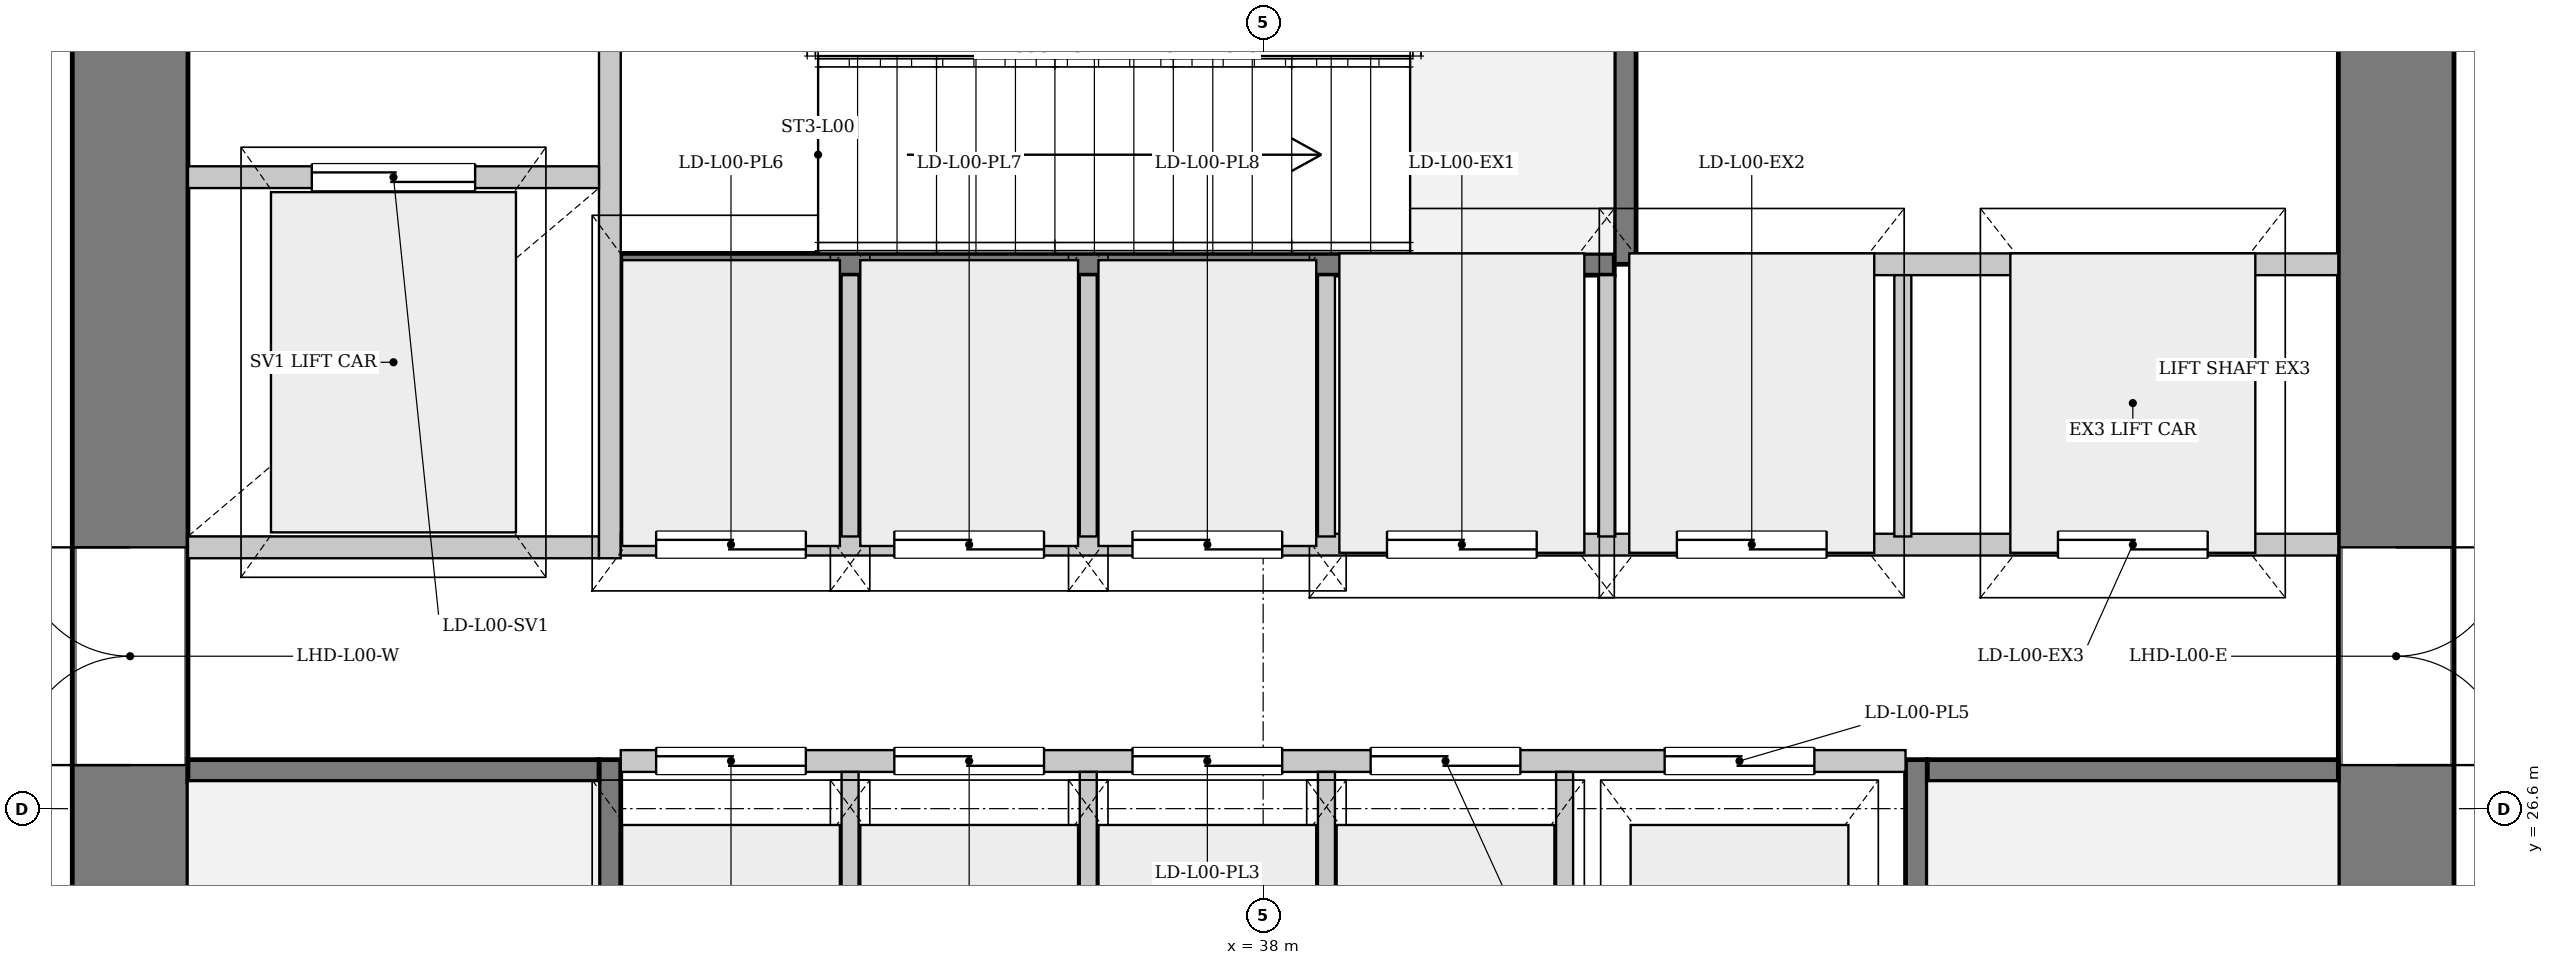
"""IFC4 building model, lengths in metres.
Left out: names, types, materials, properties, quantities, classifications, styles, units other than length and angle.
Written with IfcOpenShell. Run it as: python <this file> out.ifc"""

import sys

from ifc_helpers import new_model, si_unit, direction, frame, frame_2d, origin, place, context, subcontext, project, spatial, rectangle, extrude, source, transform, mapped, element, fill, save


model = new_model("IFC4")
c1 = context("Model", 3, precision=1e-05, world=origin(), true_north=direction((0.0, 1.0)))
c2 = subcontext(c1, "Body", "Model", "MODEL_VIEW")
j1 = project(units=[si_unit("LENGTHUNIT", "METRE"), si_unit("PLANEANGLEUNIT", "RADIAN")], contexts=[c1])
p1 = place(None, origin())
s1 = spatial("IfcSite", under=j1, at=p1, CompositionType="ELEMENT")
p2 = place(p1, origin())
s2 = spatial("IfcBuilding", under=s1, at=p2, CompositionType="ELEMENT")
p3 = place(p2, origin())
s3 = spatial("IfcBuildingStorey", under=s2, at=p3, CompositionType="ELEMENT", Elevation=0.0)
p4 = place(p3, frame((29.675, 19.5, 0.0), z_axis=(0.0, 0.0, 1.0), x_axis=(0.0, 1.0, 0.0)))
e1 = element("IfcWall", 1, at=p4, inside=s3, PredefinedType="SHEAR", context=c2, shape_type="SweptSolid", body=[
    extrude(rectangle(XDim=14.2, YDim=0.85, at=frame_2d((7.1, 0.0))), origin(), (0.0, 0.0, 1.0), 5.08),
])
p5 = place(p4, frame((7.42, 0.0, 0.0)))
e2 = element("IfcOpeningElement", 2, at=p5, cuts=e1, PredefinedType="OPENING", context=c2, shape_type="SweptSolid", body=[
    extrude(rectangle(XDim=1.6, YDim=2.2, at=frame_2d((0.8, 1.1))), frame((0.0, 0.435, 0.0), z_axis=(0.0, -1.0, 0.0), x_axis=(1.0, 0.0, 0.0)), (0.0, 0.0, 1.0), 0.87),
])
p6 = place(p3, frame((46.325, 33.7, 0.0), z_axis=(0.0, 0.0, 1.0), x_axis=(0.0, -1.0, 0.0)))
e3 = element("IfcWall", 3, at=p6, inside=s3, PredefinedType="SHEAR", context=c2, shape_type="SweptSolid", body=[
    extrude(rectangle(XDim=14.2, YDim=0.85, at=frame_2d((7.1, 0.0))), origin(), (0.0, 0.0, 1.0), 5.08),
])
p7 = place(p6, frame((5.18, 0.0, 0.0)))
e4 = element("IfcOpeningElement", 4, at=p7, cuts=e3, PredefinedType="OPENING", context=c2, shape_type="SweptSolid", body=[
    extrude(rectangle(XDim=1.6, YDim=2.2, at=frame_2d((0.8, 1.1))), frame((0.0, 0.435, 0.0), z_axis=(0.0, -1.0, 0.0), x_axis=(1.0, 0.0, 0.0)), (0.0, 0.0, 1.0), 0.87),
])
p8 = place(p3, frame((33.2, 19.5, 0.0), z_axis=(0.0, 0.0, 1.0), x_axis=(0.0, 1.0, 0.0)))
e5 = element("IfcWall", 5, at=p8, inside=s3, PredefinedType="PARTITIONING", context=c2, shape_type="SweptSolid", body=[
    extrude(rectangle(XDim=7.46, YDim=0.16, at=frame_2d((3.73, 0.0))), origin(), (0.0, 0.0, 1.0), 5.08),
])
p9 = place(p8, frame((0.08, 0.0, 0.0)))
e6 = element("IfcOpeningElement", 6, at=p9, cuts=e5, PredefinedType="OPENING", context=c2, shape_type="SweptSolid", body=[
    extrude(rectangle(XDim=1.32, YDim=2.2, at=frame_2d((0.66, 1.1))), frame((0.0, 0.09, 0.0), z_axis=(0.0, -1.0, 0.0), x_axis=(1.0, 0.0, 0.0)), (0.0, 0.0, 1.0), 0.18),
])
p10 = place(p3, frame((30.1, 26.88, 0.0), z_axis=(0.0, 0.0, 1.0), x_axis=(1.0, 0.0, 0.0)))
e7 = element("IfcWall", 7, at=p10, inside=s3, PredefinedType="PARTITIONING", context=c2, shape_type="SweptSolid", body=[
    extrude(rectangle(XDim=3.02, YDim=0.16, at=frame_2d((1.51, 0.0))), origin(), (0.0, 0.0, 1.0), 5.08),
])
p11 = place(p3, frame((42.8, 26.96, 0.0), z_axis=(0.0, 0.0, 1.0), x_axis=(0.0, -1.0, 0.0)))
e8 = element("IfcWall", 8, at=p11, inside=s3, PredefinedType="PARTITIONING", context=c2, shape_type="SweptSolid", body=[
    extrude(rectangle(XDim=7.46, YDim=0.16, at=frame_2d((3.73, 0.0))), origin(), (0.0, 0.0, 1.0), 5.08),
])
p12 = place(p11, frame((6.06, 0.0, 0.0)))
e9 = element("IfcOpeningElement", 9, at=p12, cuts=e8, PredefinedType="OPENING", context=c2, shape_type="SweptSolid", body=[
    extrude(rectangle(XDim=1.32, YDim=2.2, at=frame_2d((0.66, 1.1))), frame((0.0, 0.09, 0.0), z_axis=(0.0, -1.0, 0.0), x_axis=(1.0, 0.0, 0.0)), (0.0, 0.0, 1.0), 0.18),
])
p13 = place(p3, frame((42.88, 26.88, 0.0), z_axis=(0.0, 0.0, 1.0), x_axis=(1.0, 0.0, 0.0)))
e10 = element("IfcWall", 10, at=p13, inside=s3, PredefinedType="PARTITIONING", context=c2, shape_type="SweptSolid", body=[
    extrude(rectangle(XDim=3.02, YDim=0.16, at=frame_2d((1.51, 0.0))), origin(), (0.0, 0.0, 1.0), 5.08),
])
p14 = place(p3, frame((33.28, 30.6, 0.0), z_axis=(0.0, 0.0, 1.0), x_axis=(1.0, 0.0, 0.0)))
e11 = element("IfcWall", 11, at=p14, inside=s3, PredefinedType="PARTITIONING", context=c2, shape_type="SweptSolid", body=[
    extrude(rectangle(XDim=7.3, YDim=0.16, at=frame_2d((3.65, 0.0))), origin(), (0.0, 0.0, 1.0), 5.08),
])
p15 = place(p3, frame((40.66, 30.6, 0.0), z_axis=(0.0, 0.0, 1.0), x_axis=(0.0, 1.0, 0.0)))
e12 = element("IfcWall", 12, at=p15, inside=s3, PredefinedType="PARTITIONING", context=c2, shape_type="SweptSolid", body=[
    extrude(rectangle(XDim=3.1, YDim=0.16, at=frame_2d((1.55, 0.0))), origin(), (0.0, 0.0, 1.0), 5.08),
])
p16 = place(p3, frame((30.1, 28.52, 0.0), z_axis=(0.0, 0.0, 1.0), x_axis=(1.0, 0.0, 0.0)))
e13 = element("IfcWall", 13, at=p16, inside=s3, PredefinedType="PARTITIONING", context=c2, shape_type="SweptSolid", body=[
    extrude(rectangle(XDim=3.02, YDim=0.16, at=frame_2d((1.51, 0.0))), origin(), (0.0, 0.0, 1.0), 5.08),
])
p17 = place(p3, frame((33.2, 28.44, 0.0), z_axis=(0.0, 0.0, 1.0), x_axis=(0.0, 1.0, 0.0)))
e14 = element("IfcWall", 14, at=p17, inside=s3, PredefinedType="PARTITIONING", context=c2, shape_type="SweptSolid", body=[
    extrude(rectangle(XDim=5.26, YDim=0.16, at=frame_2d((2.63, 0.0))), origin(), (0.0, 0.0, 1.0), 5.08),
])
p18 = place(p3, frame((30.1, 31.24, 0.0), z_axis=(0.0, 0.0, 1.0), x_axis=(1.0, 0.0, 0.0)))
e15 = element("IfcWall", 15, at=p18, inside=s3, PredefinedType="PARTITIONING", context=c2, shape_type="SweptSolid", body=[
    extrude(rectangle(XDim=3.02, YDim=0.16, at=frame_2d((1.51, 0.0))), origin(), (0.0, 0.0, 1.0), 5.08),
])
p19 = place(p18, frame((0.91, 0.0, 0.0)))
e16 = element("IfcOpeningElement", 16, at=p19, cuts=e15, PredefinedType="OPENING", context=c2, shape_type="SweptSolid", body=[
    extrude(rectangle(XDim=1.2, YDim=2.2, at=frame_2d((0.6, 1.1))), frame((0.0, 0.09, 0.0), z_axis=(0.0, -1.0, 0.0), x_axis=(1.0, 0.0, 0.0)), (0.0, 0.0, 1.0), 0.18),
])
p20 = place(p3, frame((33.28, 26.95, 0.0), z_axis=(0.0, 0.0, 1.0), x_axis=(1.0, 0.0, 0.0)))
e17 = element("IfcWall", 17, at=p20, inside=s3, PredefinedType="PARTITIONING", context=c2, shape_type="SweptSolid", body=[
    extrude(rectangle(XDim=9.44, YDim=0.16, at=frame_2d((4.72, 0.0))), origin(), (0.0, 0.0, 1.0), 5.08),
])
p21 = place(p20, frame((0.26, 0.0, 0.0)))
e18 = element("IfcOpeningElement", 18, at=p21, cuts=e17, PredefinedType="OPENING", context=c2, shape_type="SweptSolid", body=[
    extrude(rectangle(XDim=1.1, YDim=2.2, at=frame_2d((0.55, 1.1))), frame((0.0, 0.09, 0.0), z_axis=(0.0, -1.0, 0.0), x_axis=(1.0, 0.0, 0.0)), (0.0, 0.0, 1.0), 0.18),
])
p22 = place(p20, frame((2.01, 0.0, 0.0)))
e19 = element("IfcOpeningElement", 19, at=p22, cuts=e17, PredefinedType="OPENING", context=c2, shape_type="SweptSolid", body=[
    extrude(rectangle(XDim=1.1, YDim=2.2, at=frame_2d((0.55, 1.1))), frame((0.0, 0.09, 0.0), z_axis=(0.0, -1.0, 0.0), x_axis=(1.0, 0.0, 0.0)), (0.0, 0.0, 1.0), 0.18),
])
p23 = place(p20, frame((3.76, 0.0, 0.0)))
e20 = element("IfcOpeningElement", 20, at=p23, cuts=e17, PredefinedType="OPENING", context=c2, shape_type="SweptSolid", body=[
    extrude(rectangle(XDim=1.1, YDim=2.2, at=frame_2d((0.55, 1.1))), frame((0.0, 0.09, 0.0), z_axis=(0.0, -1.0, 0.0), x_axis=(1.0, 0.0, 0.0)), (0.0, 0.0, 1.0), 0.18),
])
p24 = place(p20, frame((5.51, 0.0, 0.0)))
e21 = element("IfcOpeningElement", 21, at=p24, cuts=e17, PredefinedType="OPENING", context=c2, shape_type="SweptSolid", body=[
    extrude(rectangle(XDim=1.1, YDim=2.2, at=frame_2d((0.55, 1.1))), frame((0.0, 0.09, 0.0), z_axis=(0.0, -1.0, 0.0), x_axis=(1.0, 0.0, 0.0)), (0.0, 0.0, 1.0), 0.18),
])
p25 = place(p20, frame((7.67, 0.0, 0.0)))
e22 = element("IfcOpeningElement", 22, at=p25, cuts=e17, PredefinedType="OPENING", context=c2, shape_type="SweptSolid", body=[
    extrude(rectangle(XDim=1.1, YDim=2.2, at=frame_2d((0.55, 1.1))), frame((0.0, 0.09, 0.0), z_axis=(0.0, -1.0, 0.0), x_axis=(1.0, 0.0, 0.0)), (0.0, 0.0, 1.0), 0.18),
])
for number, where, z_axis, x_axis in (
    (23, (34.965, 24.56, 0.0), (0.0, 0.0, 1.0), (0.0, 1.0, 0.0)),
    (24, (36.715, 24.56, 0.0), (0.0, 0.0, 1.0), (0.0, 1.0, 0.0)),
    (25, (38.465, 24.56, 0.0), (0.0, 0.0, 1.0), (0.0, 1.0, 0.0)),
    (26, (40.215, 24.56, 0.0), (0.0, 0.0, 1.0), (0.0, 1.0, 0.0)),
):
    element("IfcWall", number, at=place(p3, frame(where, z_axis=z_axis, x_axis=x_axis)), inside=s3, PredefinedType="PARTITIONING", context=c2, shape_type="SweptSolid", body=[
        extrude(rectangle(XDim=2.31, YDim=0.125, at=frame_2d((1.155, 0.0))), origin(), (0.0, 0.0, 1.0), 5.08),
    ])
p26 = place(p3, frame((33.28, 28.54, 0.0), z_axis=(0.0, 0.0, 1.0), x_axis=(1.0, 0.0, 0.0)))
e27 = element("IfcWall", 27, at=p26, inside=s3, PredefinedType="PARTITIONING", context=c2, shape_type="SweptSolid", body=[
    extrude(rectangle(XDim=12.62, YDim=0.16, at=frame_2d((6.31, 0.0))), origin(), (0.0, 0.0, 1.0), 5.08),
])
p27 = place(p26, frame((0.26, 0.0, 0.0)))
e28 = element("IfcOpeningElement", 28, at=p27, cuts=e27, PredefinedType="OPENING", context=c2, shape_type="SweptSolid", body=[
    extrude(rectangle(XDim=1.1, YDim=2.2, at=frame_2d((0.55, 1.1))), frame((0.0, 0.09, 0.0), z_axis=(0.0, -1.0, 0.0), x_axis=(1.0, 0.0, 0.0)), (0.0, 0.0, 1.0), 0.18),
])
p28 = place(p26, frame((2.01, 0.0, 0.0)))
e29 = element("IfcOpeningElement", 29, at=p28, cuts=e27, PredefinedType="OPENING", context=c2, shape_type="SweptSolid", body=[
    extrude(rectangle(XDim=1.1, YDim=2.2, at=frame_2d((0.55, 1.1))), frame((0.0, 0.09, 0.0), z_axis=(0.0, -1.0, 0.0), x_axis=(1.0, 0.0, 0.0)), (0.0, 0.0, 1.0), 0.18),
])
p29 = place(p26, frame((3.76, 0.0, 0.0)))
e30 = element("IfcOpeningElement", 30, at=p29, cuts=e27, PredefinedType="OPENING", context=c2, shape_type="SweptSolid", body=[
    extrude(rectangle(XDim=1.1, YDim=2.2, at=frame_2d((0.55, 1.1))), frame((0.0, 0.09, 0.0), z_axis=(0.0, -1.0, 0.0), x_axis=(1.0, 0.0, 0.0)), (0.0, 0.0, 1.0), 0.18),
])
p30 = place(p26, frame((5.63, 0.0, 0.0)))
e31 = element("IfcOpeningElement", 31, at=p30, cuts=e27, PredefinedType="OPENING", context=c2, shape_type="SweptSolid", body=[
    extrude(rectangle(XDim=1.1, YDim=2.2, at=frame_2d((0.55, 1.1))), frame((0.0, 0.09, 0.0), z_axis=(0.0, -1.0, 0.0), x_axis=(1.0, 0.0, 0.0)), (0.0, 0.0, 1.0), 0.18),
])
p31 = place(p26, frame((7.76, 0.0, 0.0)))
e32 = element("IfcOpeningElement", 32, at=p31, cuts=e27, PredefinedType="OPENING", context=c2, shape_type="SweptSolid", body=[
    extrude(rectangle(XDim=1.1, YDim=2.2, at=frame_2d((0.55, 1.1))), frame((0.0, 0.09, 0.0), z_axis=(0.0, -1.0, 0.0), x_axis=(1.0, 0.0, 0.0)), (0.0, 0.0, 1.0), 0.18),
])
p32 = place(p26, frame((10.56, 0.0, 0.0)))
e33 = element("IfcOpeningElement", 33, at=p32, cuts=e27, PredefinedType="OPENING", context=c2, shape_type="SweptSolid", body=[
    extrude(rectangle(XDim=1.1, YDim=2.2, at=frame_2d((0.55, 1.1))), frame((0.0, 0.09, 0.0), z_axis=(0.0, -1.0, 0.0), x_axis=(1.0, 0.0, 0.0)), (0.0, 0.0, 1.0), 0.18),
])
p33 = place(p3, frame((40.72, 30.6, 0.0), z_axis=(0.0, 0.0, 1.0), x_axis=(1.0, 0.0, 0.0)))
e34 = element("IfcWall", 34, at=p33, inside=s3, PredefinedType="PARTITIONING", context=c2, shape_type="SweptSolid", body=[
    extrude(rectangle(XDim=5.18, YDim=0.16, at=frame_2d((2.59, 0.0))), origin(), (0.0, 0.0, 1.0), 5.08),
])
for number, where, z_axis, x_axis in (
    (35, (34.965, 28.6, 0.0), (0.0, 0.0, 1.0), (0.0, 1.0, 0.0)),
    (36, (36.715, 28.6, 0.0), (0.0, 0.0, 1.0), (0.0, 1.0, 0.0)),
    (37, (38.465, 28.6, 0.0), (0.0, 0.0, 1.0), (0.0, 1.0, 0.0)),
    (38, (40.525, 28.6, 0.0), (0.0, 0.0, 1.0), (0.0, 1.0, 0.0)),
    (39, (42.7, 28.6, 0.0), (0.0, 0.0, 1.0), (0.0, 1.0, 0.0)),
):
    element("IfcWall", number, at=place(p3, frame(where, z_axis=z_axis, x_axis=x_axis)), inside=s3, PredefinedType="PARTITIONING", context=c2, shape_type="SweptSolid", body=[
        extrude(rectangle(XDim=1.92, YDim=0.125, at=frame_2d((0.96, 0.0))), origin(), (0.0, 0.0, 1.0), 5.08),
    ])
m1 = source(origin(), c2, "Body", "SweptSolid", [
    extrude(rectangle(XDim=1.6, YDim=2.2, at=frame_2d((0.8, 1.1))), frame((0.0, 0.025, 0.0), z_axis=(0.0, -1.0, 0.0), x_axis=(1.0, 0.0, 0.0)), (0.0, 0.0, 1.0), 0.05),
])
p34 = place(p5, origin())
e40 = element("IfcDoor", 40, at=p34, inside=s3, OperationType="DOUBLE_DOOR_SINGLE_SWING", PredefinedType="DOOR", context=c2, shape_type="MappedRepresentation", body=[
    mapped(m1, transform((0.0, 0.0, 0.0), x_axis=(1.0, 0.0, 0.0), y_axis=(0.0, 1.0, 0.0), z_axis=(0.0, 0.0, 1.0), scale=1.0)),
])
fill(e2, e40)
p35 = place(p7, origin())
e41 = element("IfcDoor", 41, at=p35, inside=s3, OperationType="DOUBLE_DOOR_SINGLE_SWING", PredefinedType="DOOR", context=c2, shape_type="MappedRepresentation", body=[
    mapped(m1, transform((0.0, 0.0, 0.0), x_axis=(1.0, 0.0, 0.0), y_axis=(0.0, 1.0, 0.0), z_axis=(0.0, 0.0, 1.0), scale=1.0)),
])
fill(e4, e41)
m2 = source(origin(), c2, "Body", "SweptSolid", [
    extrude(rectangle(XDim=1.2, YDim=2.2, at=frame_2d((0.6, 1.1))), frame((0.0, 0.025, 0.0), z_axis=(0.0, -1.0, 0.0), x_axis=(1.0, 0.0, 0.0)), (0.0, 0.0, 1.0), 0.05),
])
p36 = place(p19, origin())
e42 = element("IfcDoor", 42, at=p36, inside=s3, OperationType="DOUBLE_DOOR_SLIDING", PredefinedType="DOOR", context=c2, shape_type="MappedRepresentation", body=[
    mapped(m2, transform((0.0, 0.0, 0.0), x_axis=(1.0, 0.0, 0.0), y_axis=(0.0, 1.0, 0.0), z_axis=(0.0, 0.0, 1.0), scale=1.0)),
])
fill(e16, e42)
m3 = source(origin(), c2, "Body", "SweptSolid", [
    extrude(rectangle(XDim=1.1, YDim=2.2, at=frame_2d((0.55, 1.1))), frame((0.0, 0.025, 0.0), z_axis=(0.0, -1.0, 0.0), x_axis=(1.0, 0.0, 0.0)), (0.0, 0.0, 1.0), 0.05),
])
p37 = place(p21, origin())
e43 = element("IfcDoor", 43, at=p37, inside=s3, OperationType="DOUBLE_DOOR_SLIDING", PredefinedType="DOOR", context=c2, shape_type="MappedRepresentation", body=[
    mapped(m3, transform((0.0, 0.0, 0.0), x_axis=(1.0, 0.0, 0.0), y_axis=(0.0, 1.0, 0.0), z_axis=(0.0, 0.0, 1.0), scale=1.0)),
])
fill(e18, e43)
p38 = place(p22, origin())
e44 = element("IfcDoor", 44, at=p38, inside=s3, OperationType="DOUBLE_DOOR_SLIDING", PredefinedType="DOOR", context=c2, shape_type="MappedRepresentation", body=[
    mapped(m3, transform((0.0, 0.0, 0.0), x_axis=(1.0, 0.0, 0.0), y_axis=(0.0, 1.0, 0.0), z_axis=(0.0, 0.0, 1.0), scale=1.0)),
])
fill(e19, e44)
p39 = place(p23, origin())
e45 = element("IfcDoor", 45, at=p39, inside=s3, OperationType="DOUBLE_DOOR_SLIDING", PredefinedType="DOOR", context=c2, shape_type="MappedRepresentation", body=[
    mapped(m3, transform((0.0, 0.0, 0.0), x_axis=(1.0, 0.0, 0.0), y_axis=(0.0, 1.0, 0.0), z_axis=(0.0, 0.0, 1.0), scale=1.0)),
])
fill(e20, e45)
p40 = place(p24, origin())
e46 = element("IfcDoor", 46, at=p40, inside=s3, OperationType="DOUBLE_DOOR_SLIDING", PredefinedType="DOOR", context=c2, shape_type="MappedRepresentation", body=[
    mapped(m3, transform((0.0, 0.0, 0.0), x_axis=(1.0, 0.0, 0.0), y_axis=(0.0, 1.0, 0.0), z_axis=(0.0, 0.0, 1.0), scale=1.0)),
])
fill(e21, e46)
p41 = place(p25, origin())
e47 = element("IfcDoor", 47, at=p41, inside=s3, OperationType="DOUBLE_DOOR_SLIDING", PredefinedType="DOOR", context=c2, shape_type="MappedRepresentation", body=[
    mapped(m3, transform((0.0, 0.0, 0.0), x_axis=(1.0, 0.0, 0.0), y_axis=(0.0, 1.0, 0.0), z_axis=(0.0, 0.0, 1.0), scale=1.0)),
])
fill(e22, e47)
p42 = place(p27, origin())
e48 = element("IfcDoor", 48, at=p42, inside=s3, OperationType="DOUBLE_DOOR_SLIDING", PredefinedType="DOOR", context=c2, shape_type="MappedRepresentation", body=[
    mapped(m3, transform((0.0, 0.0, 0.0), x_axis=(1.0, 0.0, 0.0), y_axis=(0.0, 1.0, 0.0), z_axis=(0.0, 0.0, 1.0), scale=1.0)),
])
fill(e28, e48)
p43 = place(p28, origin())
e49 = element("IfcDoor", 49, at=p43, inside=s3, OperationType="DOUBLE_DOOR_SLIDING", PredefinedType="DOOR", context=c2, shape_type="MappedRepresentation", body=[
    mapped(m3, transform((0.0, 0.0, 0.0), x_axis=(1.0, 0.0, 0.0), y_axis=(0.0, 1.0, 0.0), z_axis=(0.0, 0.0, 1.0), scale=1.0)),
])
fill(e29, e49)
p44 = place(p29, origin())
e50 = element("IfcDoor", 50, at=p44, inside=s3, OperationType="DOUBLE_DOOR_SLIDING", PredefinedType="DOOR", context=c2, shape_type="MappedRepresentation", body=[
    mapped(m3, transform((0.0, 0.0, 0.0), x_axis=(1.0, 0.0, 0.0), y_axis=(0.0, 1.0, 0.0), z_axis=(0.0, 0.0, 1.0), scale=1.0)),
])
fill(e30, e50)
p45 = place(p30, origin())
e51 = element("IfcDoor", 51, at=p45, inside=s3, OperationType="DOUBLE_DOOR_SLIDING", PredefinedType="DOOR", context=c2, shape_type="MappedRepresentation", body=[
    mapped(m3, transform((0.0, 0.0, 0.0), x_axis=(1.0, 0.0, 0.0), y_axis=(0.0, 1.0, 0.0), z_axis=(0.0, 0.0, 1.0), scale=1.0)),
])
fill(e31, e51)
p46 = place(p31, origin())
e52 = element("IfcDoor", 52, at=p46, inside=s3, OperationType="DOUBLE_DOOR_SLIDING", PredefinedType="DOOR", context=c2, shape_type="MappedRepresentation", body=[
    mapped(m3, transform((0.0, 0.0, 0.0), x_axis=(1.0, 0.0, 0.0), y_axis=(0.0, 1.0, 0.0), z_axis=(0.0, 0.0, 1.0), scale=1.0)),
])
fill(e32, e52)
p47 = place(p32, origin())
e53 = element("IfcDoor", 53, at=p47, inside=s3, OperationType="DOUBLE_DOOR_SLIDING", PredefinedType="DOOR", context=c2, shape_type="MappedRepresentation", body=[
    mapped(m3, transform((0.0, 0.0, 0.0), x_axis=(1.0, 0.0, 0.0), y_axis=(0.0, 1.0, 0.0), z_axis=(0.0, 0.0, 1.0), scale=1.0)),
])
fill(e33, e53)
save(model, sys.argv[1])
